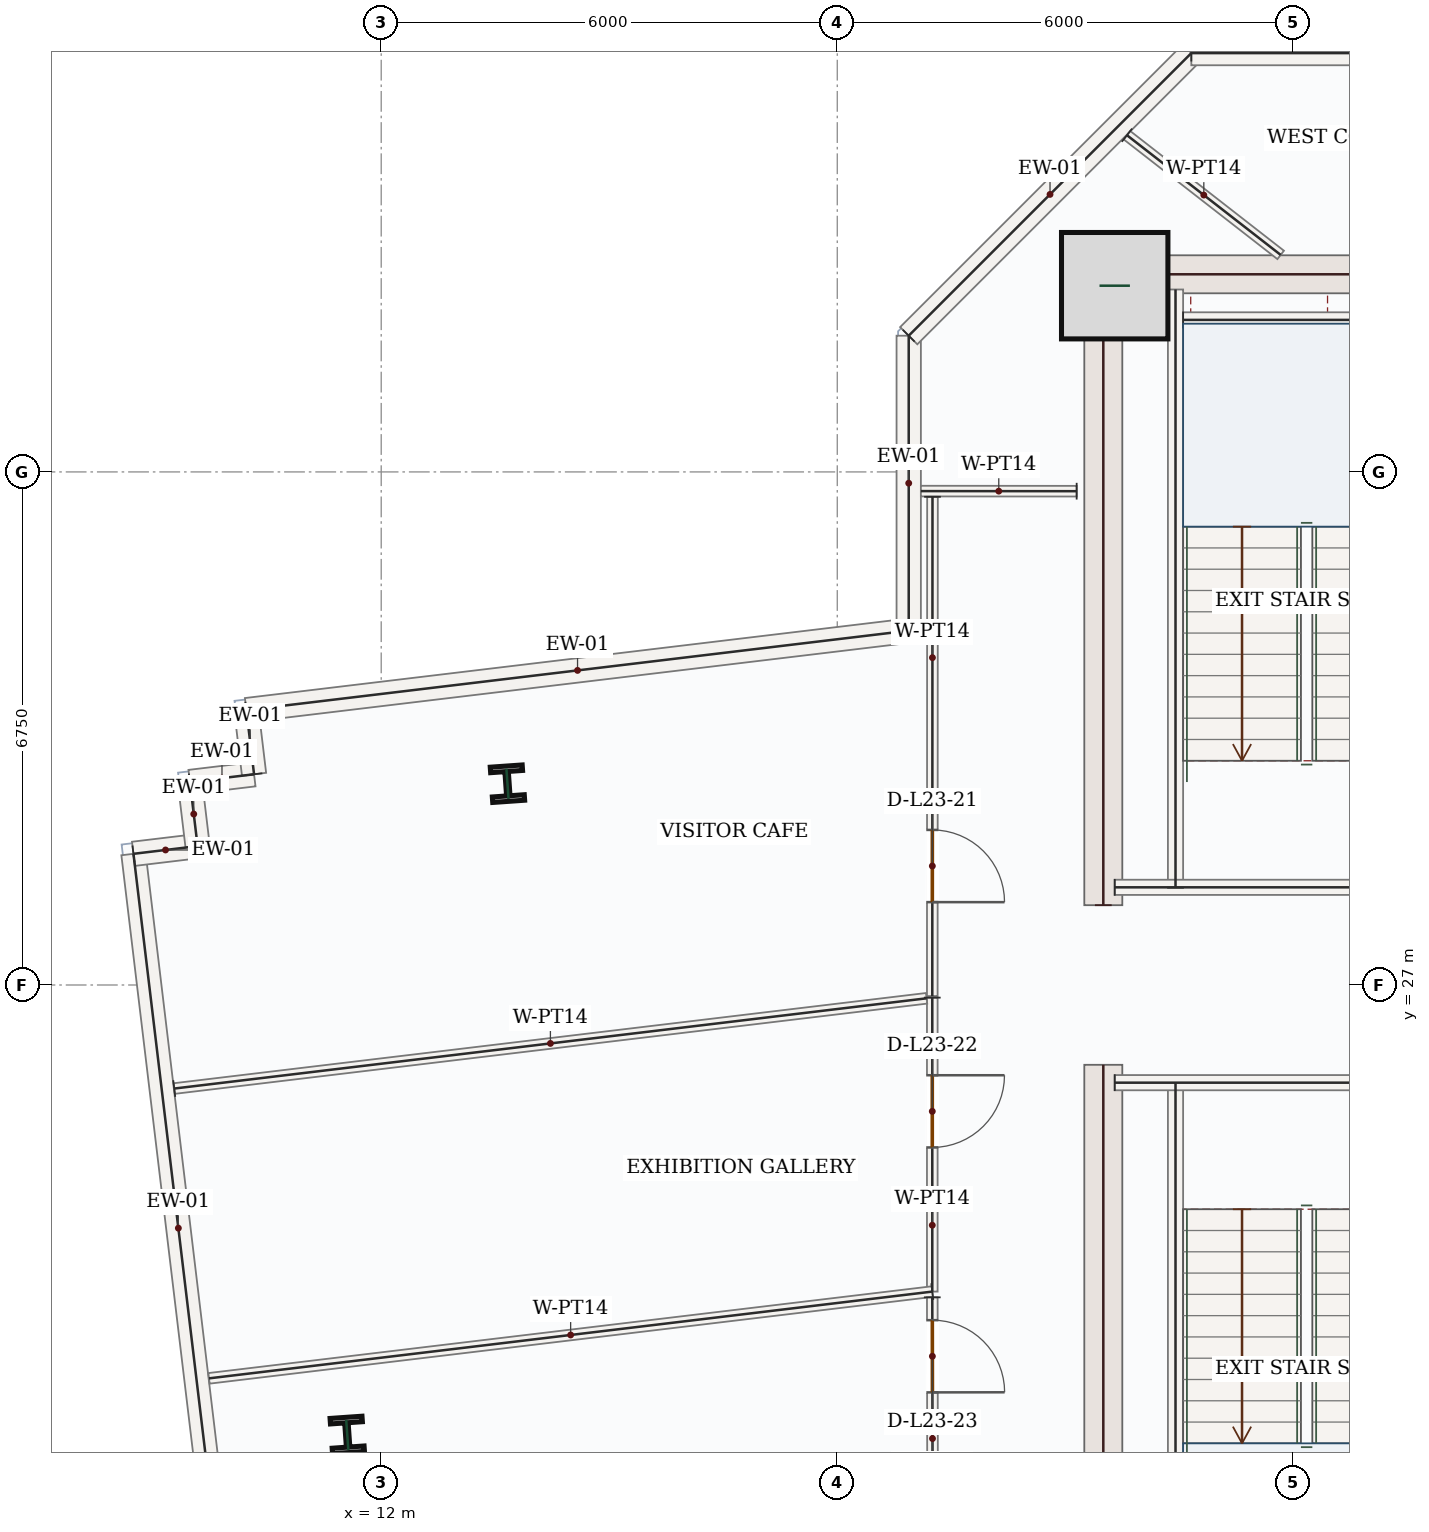
"""IFC4 building model, lengths in metres.
Left out: names, types, materials, properties, quantities, classifications, styles, units other than length and angle.
Written with IfcOpenShell. Run it as: python <this file> out.ifc"""

import sys

from ifc_helpers import new_model, si_unit, direction, frame, frame_2d, origin, origin_2d, place, context, subcontext, project, spatial, rectangle, i_section, extrude, source, transform, mapped, element, fill, save


model = new_model("IFC4")
c1 = context("Model", 3, precision=1e-05, world=origin(), true_north=direction((0.0, 1.0)))
c2 = subcontext(c1, "Body", "Model", "MODEL_VIEW")
j1 = project(units=[si_unit("LENGTHUNIT", "METRE"), si_unit("PLANEANGLEUNIT", "RADIAN")], contexts=[c1])
p1 = place(None, origin())
s1 = spatial("IfcSite", under=j1, at=p1, CompositionType="ELEMENT")
p2 = place(p1, origin())
s2 = spatial("IfcBuilding", under=s1, at=p2, CompositionType="ELEMENT")
p3 = place(p2, frame((0.0, 0.0, 104.7)))
s3 = spatial("IfcBuildingStorey", under=s2, at=p3, CompositionType="ELEMENT", Elevation=104.7)
m1 = source(origin(), c2, "Body", "SweptSolid", [
    extrude(rectangle(XDim=8.55, YDim=0.5, at=frame_2d((4.275, 0.0))), origin(), (0.0, 0.0, 1.0), 3.95),
])
for number, where, z_axis, x_axis in (
    (1, (21.5, 17.4, 0.0), (0.0, 0.0, 1.0), (0.0, 1.0, 0.0)),
    (2, (21.5, 28.05, 0.0), (0.0, 0.0, 1.0), (0.0, 1.0, 0.0)),
):
    element("IfcWall", number, at=place(p3, frame(where, z_axis=z_axis, x_axis=x_axis)), inside=s3, PredefinedType="SHEAR", context=c2, shape_type="MappedRepresentation", body=[
        mapped(m1, transform((0.0, 0.0, 0.0), x_axis=(1.0, 0.0, 0.0), y_axis=(0.0, 1.0, 0.0), z_axis=(0.0, 0.0, 1.0), scale=1.0)),
    ])
m2 = source(origin(), c2, "Body", "SweptSolid", [
    extrude(rectangle(XDim=7.0, YDim=0.5, at=frame_2d((3.5, 0.0))), origin(), (0.0, 0.0, 1.0), 3.95),
])
p4 = place(p3, frame((21.75, 36.35, 0.0), z_axis=(0.0, 0.0, 1.0), x_axis=(1.0, 0.0, 0.0)))
e3 = element("IfcWall", 3, at=p4, inside=s3, PredefinedType="SHEAR", context=c2, shape_type="MappedRepresentation", body=[
    mapped(m2, transform((0.0, 0.0, 0.0), x_axis=(1.0, 0.0, 0.0), y_axis=(0.0, 1.0, 0.0), z_axis=(0.0, 0.0, 1.0), scale=1.0)),
])
m3 = source(origin(), c2, "Body", "SweptSolid", [
    extrude(rectangle(XDim=1.4, YDim=1.4, at=origin_2d()), origin(), (0.0, 0.0, 1.0), 4.2),
])
p5 = place(p3, frame((21.65, 36.2, 0.0), z_axis=(0.0, 0.0, 1.0), x_axis=(1.0, 0.0, 0.0)))
e4 = element("IfcColumn", 4, at=p5, inside=s3, PredefinedType="COLUMN", context=c2, shape_type="MappedRepresentation", body=[
    mapped(m3, transform((0.0, 0.0, 0.0), x_axis=(1.0, 0.0, 0.0), y_axis=(0.0, 1.0, 0.0), z_axis=(0.0, 0.0, 1.0), scale=1.0)),
])
m4 = source(origin(), c2, "Body", "SweptSolid", [
    extrude(i_section(OverallWidth=0.421, OverallDepth=0.465, WebThickness=0.045, FlangeThickness=0.073, FilletRadius=0.018, at=origin_2d()), origin(), (0.0, 0.0, 1.0), 4.2),
])
for number, where, z_axis, x_axis in (
    (5, (13.661, 29.648, 0.0), (0.0, 0.0, 1.0), (0.998, 0.07, 0.0)),
    (6, (11.553, 21.08, 0.0), (0.0, 0.0, 1.0), (0.998, 0.07, 0.0)),
):
    element("IfcColumn", number, at=place(p3, frame(where, z_axis=z_axis, x_axis=x_axis)), inside=s3, PredefinedType="COLUMN", context=c2, shape_type="MappedRepresentation", body=[
        mapped(m4, transform((0.0, 0.0, 0.0), x_axis=(1.0, 0.0, 0.0), y_axis=(0.0, 1.0, 0.0), z_axis=(0.0, 0.0, 1.0), scale=1.0)),
    ])
m5 = source(origin(), c2, "Body", "SweptSolid", [
    extrude(rectangle(XDim=9.92, YDim=0.32, at=frame_2d((4.96, 0.0))), origin(), (0.0, 0.0, 1.0), 3.95),
])
p6 = place(p3, frame((9.922, 18.876, 0.0), z_axis=(0.0, 0.0, 1.0), x_axis=(-0.119092815244, 0.992883125729, 0.0)))
e7 = element("IfcWall", 7, at=p6, inside=s3, PredefinedType="SOLIDWALL", context=c2, shape_type="MappedRepresentation", body=[
    mapped(m5, transform((0.0, 0.0, 0.0), x_axis=(1.0, 0.0, 0.0), y_axis=(0.0, 1.0, 0.0), z_axis=(0.0, 0.0, 1.0), scale=1.0)),
])
m6 = source(origin(), c2, "Body", "SweptSolid", [
    extrude(rectangle(XDim=0.85, YDim=0.32, at=frame_2d((0.425, 0.0))), origin(), (0.0, 0.0, 1.0), 3.95),
])
for number, where, z_axis, x_axis in (
    (8, (8.74, 28.726, 0.0), (0.0, 0.0, 1.0), (0.993, 0.119, 0.0)),
    (9, (9.584, 28.827, 0.0), (0.0, 0.0, 1.0), (-0.119, 0.993, 0.0)),
    (10, (9.483, 29.671, 0.0), (0.0, 0.0, 1.0), (0.993, 0.119, 0.0)),
    (11, (10.327, 29.772, 0.0), (0.0, 0.0, 1.0), (-0.119, 0.993, 0.0)),
):
    element("IfcWall", number, at=place(p3, frame(where, z_axis=z_axis, x_axis=x_axis)), inside=s3, PredefinedType="SOLIDWALL", context=c2, shape_type="MappedRepresentation", body=[
        mapped(m6, transform((0.0, 0.0, 0.0), x_axis=(1.0, 0.0, 0.0), y_axis=(0.0, 1.0, 0.0), z_axis=(0.0, 0.0, 1.0), scale=1.0)),
    ])
m7 = source(origin(), c2, "Body", "SweptSolid", [
    extrude(rectangle(XDim=8.777, YDim=0.32, at=frame_2d((4.388, 0.0))), origin(), (0.0, 0.0, 1.0), 3.95),
])
p7 = place(p3, frame((10.226, 30.616, 0.0), z_axis=(0.0, 0.0, 1.0), x_axis=(0.992883944618, 0.119085987922, 0.0)))
e12 = element("IfcWall", 12, at=p7, inside=s3, PredefinedType="SOLIDWALL", context=c2, shape_type="MappedRepresentation", body=[
    mapped(m7, transform((0.0, 0.0, 0.0), x_axis=(1.0, 0.0, 0.0), y_axis=(0.0, 1.0, 0.0), z_axis=(0.0, 0.0, 1.0), scale=1.0)),
])
m8 = source(origin(), c2, "Body", "SweptSolid", [
    extrude(rectangle(XDim=3.881, YDim=0.32, at=frame_2d((1.94, 0.0))), origin(), (0.0, 0.0, 1.0), 3.95),
])
p8 = place(p3, frame((18.94, 31.661, 0.0), z_axis=(0.0, 0.0, 1.0), x_axis=(0.0, 1.0, 0.0)))
e13 = element("IfcWall", 13, at=p8, inside=s3, PredefinedType="SOLIDWALL", context=c2, shape_type="MappedRepresentation", body=[
    mapped(m8, transform((0.0, 0.0, 0.0), x_axis=(1.0, 0.0, 0.0), y_axis=(0.0, 1.0, 0.0), z_axis=(0.0, 0.0, 1.0), scale=1.0)),
])
m9 = source(origin(), c2, "Body", "SweptSolid", [
    extrude(rectangle(XDim=5.258, YDim=0.32, at=frame_2d((2.629, 0.0))), origin(), (0.0, 0.0, 1.0), 3.95),
])
p9 = place(p3, frame((18.94, 35.542, 0.0), z_axis=(0.0, 0.0, 1.0), x_axis=(0.707106781187, 0.707106781187, 0.0)))
e14 = element("IfcWall", 14, at=p9, inside=s3, PredefinedType="SOLIDWALL", context=c2, shape_type="MappedRepresentation", body=[
    mapped(m9, transform((0.0, 0.0, 0.0), x_axis=(1.0, 0.0, 0.0), y_axis=(0.0, 1.0, 0.0), z_axis=(0.0, 0.0, 1.0), scale=1.0)),
])
m10 = source(origin(), c2, "Body", "SweptSolid", [
    extrude(rectangle(XDim=5.164, YDim=0.32, at=frame_2d((2.582, 0.0))), origin(), (0.0, 0.0, 1.0), 3.95),
])
p10 = place(p3, frame((22.658, 39.26, 0.0), z_axis=(0.0, 0.0, 1.0), x_axis=(1.0, 0.0, 0.0)))
e15 = element("IfcWall", 15, at=p10, inside=s3, PredefinedType="SOLIDWALL", context=c2, shape_type="MappedRepresentation", body=[
    mapped(m10, transform((0.0, 0.0, 0.0), x_axis=(1.0, 0.0, 0.0), y_axis=(0.0, 1.0, 0.0), z_axis=(0.0, 0.0, 1.0), scale=1.0)),
])
m11 = source(origin(), c2, "Body", "SweptSolid", [
    extrude(rectangle(XDim=7.87, YDim=0.2, at=frame_2d((3.935, 0.0))), origin(), (0.0, 0.0, 1.0), 3.95),
])
for number, where, z_axis, x_axis in (
    (16, (22.45, 17.85, 0.0), (0.0, 0.0, 1.0), (0.0, 1.0, 0.0)),
    (17, (22.45, 28.28, 0.0), (0.0, 0.0, 1.0), (0.0, 1.0, 0.0)),
):
    element("IfcWall", number, at=place(p3, frame(where, z_axis=z_axis, x_axis=x_axis)), inside=s3, PredefinedType="SOLIDWALL", context=c2, shape_type="MappedRepresentation", body=[
        mapped(m11, transform((0.0, 0.0, 0.0), x_axis=(1.0, 0.0, 0.0), y_axis=(0.0, 1.0, 0.0), z_axis=(0.0, 0.0, 1.0), scale=1.0)),
    ])
m12 = source(origin(), c2, "Body", "SweptSolid", [
    extrude(rectangle(XDim=4.25, YDim=0.2, at=frame_2d((2.125, 0.0))), origin(), (0.0, 0.0, 1.0), 3.95),
])
for number, where, z_axis, x_axis in (
    (18, (21.65, 25.715, 0.0), (0.0, 0.0, 1.0), (1.0, 0.0, 0.0)),
    (19, (21.65, 28.285, 0.0), (0.0, 0.0, 1.0), (1.0, 0.0, 0.0)),
):
    element("IfcWall", number, at=place(p3, frame(where, z_axis=z_axis, x_axis=x_axis)), inside=s3, PredefinedType="SOLIDWALL", context=c2, shape_type="MappedRepresentation", body=[
        mapped(m12, transform((0.0, 0.0, 0.0), x_axis=(1.0, 0.0, 0.0), y_axis=(0.0, 1.0, 0.0), z_axis=(0.0, 0.0, 1.0), scale=1.0)),
    ])
m13 = source(origin(), c2, "Body", "SweptSolid", [
    extrude(rectangle(XDim=3.25, YDim=0.2, at=frame_2d((1.625, 0.0))), origin(), (0.0, 0.0, 1.0), 3.95),
])
p11 = place(p3, frame((22.55, 35.75, 0.0), z_axis=(0.0, 0.0, 1.0), x_axis=(1.0, 0.0, 0.0)))
e20 = element("IfcWall", 20, at=p11, inside=s3, PredefinedType="SOLIDWALL", context=c2, shape_type="MappedRepresentation", body=[
    mapped(m13, transform((0.0, 0.0, 0.0), x_axis=(1.0, 0.0, 0.0), y_axis=(0.0, 1.0, 0.0), z_axis=(0.0, 0.0, 1.0), scale=1.0)),
])
p12 = place(p3, frame((19.25, 26.834, 0.0), z_axis=(0.0, 0.0, 1.0), x_axis=(0.0, -1.0, 0.0)))
e21 = element("IfcWall", 21, at=p12, inside=s3, PredefinedType="PARTITIONING", context=c2, shape_type="SweptSolid", body=[
    extrude(rectangle(XDim=3.868, YDim=0.14, at=frame_2d((1.934, 0.0))), origin(), (0.0, 0.0, 1.0), 3.95),
])
p13 = place(p12, frame((1.021, 0.0, 0.0)))
e22 = element("IfcOpeningElement", 22, at=p13, cuts=e21, PredefinedType="OPENING", context=c2, shape_type="SweptSolid", body=[
    extrude(rectangle(XDim=0.95, YDim=2.15, at=frame_2d((0.475, 1.075))), frame((0.0, 0.08, 0.0), z_axis=(0.0, -1.0, 0.0), x_axis=(1.0, 0.0, 0.0)), (0.0, 0.0, 1.0), 0.16),
])
m14 = source(origin(), c2, "Body", "SweptSolid", [
    extrude(rectangle(XDim=9.584, YDim=0.14, at=frame_2d((4.792, 0.0))), origin(), (0.0, 0.0, 1.0), 3.95),
])
p14 = place(p3, frame((19.25, 22.966, 0.0), z_axis=(0.0, 0.0, 1.0), x_axis=(-0.992883225705, -0.119091981737, 0.0)))
e23 = element("IfcWall", 23, at=p14, inside=s3, PredefinedType="PARTITIONING", context=c2, shape_type="MappedRepresentation", body=[
    mapped(m14, transform((0.0, 0.0, 0.0), x_axis=(1.0, 0.0, 0.0), y_axis=(0.0, 1.0, 0.0), z_axis=(0.0, 0.0, 1.0), scale=1.0)),
])
m15 = source(origin(), c2, "Body", "SweptSolid", [
    extrude(rectangle(XDim=9.969, YDim=0.14, at=frame_2d((4.984, 0.0))), origin(), (0.0, 0.0, 1.0), 3.95),
])
p15 = place(p3, frame((9.277, 25.638, 0.0), z_axis=(0.0, 0.0, 1.0), x_axis=(0.992882747367, 0.119095969623, 0.0)))
e24 = element("IfcWall", 24, at=p15, inside=s3, PredefinedType="PARTITIONING", context=c2, shape_type="MappedRepresentation", body=[
    mapped(m15, transform((0.0, 0.0, 0.0), x_axis=(1.0, 0.0, 0.0), y_axis=(0.0, 1.0, 0.0), z_axis=(0.0, 0.0, 1.0), scale=1.0)),
])
m16 = source(origin(), c2, "Body", "SweptSolid", [
    extrude(rectangle(XDim=2.049, YDim=0.14, at=frame_2d((1.025, 0.0))), origin(), (0.0, 0.0, 1.0), 3.95),
])
p16 = place(p3, frame((21.149, 33.497, 0.0), z_axis=(0.0, 0.0, 1.0), x_axis=(-0.999999822593, 0.000595663464, 0.0)))
e25 = element("IfcWall", 25, at=p16, inside=s3, PredefinedType="PARTITIONING", context=c2, shape_type="MappedRepresentation", body=[
    mapped(m16, transform((0.0, 0.0, 0.0), x_axis=(1.0, 0.0, 0.0), y_axis=(0.0, 1.0, 0.0), z_axis=(0.0, 0.0, 1.0), scale=1.0)),
])
p17 = place(p3, frame((19.253, 33.423, 0.0), z_axis=(0.0, 0.0, 1.0), x_axis=(-0.000408845905, -0.999999916423, 0.0)))
e26 = element("IfcWall", 26, at=p17, inside=s3, PredefinedType="PARTITIONING", context=c2, shape_type="SweptSolid", body=[
    extrude(rectangle(XDim=6.569, YDim=0.14, at=frame_2d((3.284, 0.0))), origin(), (0.0, 0.0, 1.0), 3.95),
])
p18 = place(p17, frame((4.382, 0.0, 0.0)))
e27 = element("IfcOpeningElement", 27, at=p18, cuts=e26, PredefinedType="OPENING", context=c2, shape_type="SweptSolid", body=[
    extrude(rectangle(XDim=0.95, YDim=2.15, at=frame_2d((0.475, 1.075))), frame((0.0, 0.08, 0.0), z_axis=(0.0, -1.0, 0.0), x_axis=(1.0, 0.0, 0.0)), (0.0, 0.0, 1.0), 0.16),
])
m17 = source(origin(), c2, "Body", "SweptSolid", [
    extrude(rectangle(XDim=2.563, YDim=0.14, at=frame_2d((1.282, 0.0))), origin(), (0.0, 0.0, 1.0), 3.95),
])
p19 = place(p3, frame((21.811, 38.18, 0.0), z_axis=(0.0, 0.0, 1.0), x_axis=(0.789034129839, -0.614349364734, 0.0)))
e28 = element("IfcWall", 28, at=p19, inside=s3, PredefinedType="PARTITIONING", context=c2, shape_type="MappedRepresentation", body=[
    mapped(m17, transform((0.0, 0.0, 0.0), x_axis=(1.0, 0.0, 0.0), y_axis=(0.0, 1.0, 0.0), z_axis=(0.0, 0.0, 1.0), scale=1.0)),
])
p20 = place(p3, frame((19.25, 22.891, 0.0), z_axis=(0.0, 0.0, 1.0), x_axis=(0.001476168784, -0.999998910462, 0.0)))
e29 = element("IfcWall", 29, at=p20, inside=s3, PredefinedType="PARTITIONING", context=c2, shape_type="SweptSolid", body=[
    extrude(rectangle(XDim=2.315, YDim=0.14, at=frame_2d((1.158, 0.0))), origin(), (0.0, 0.0, 1.0), 3.95),
])
p21 = place(p20, frame((0.3, 0.0, 0.0)))
e30 = element("IfcOpeningElement", 30, at=p21, cuts=e29, PredefinedType="OPENING", context=c2, shape_type="SweptSolid", body=[
    extrude(rectangle(XDim=0.95, YDim=2.15, at=frame_2d((0.475, 1.075))), frame((0.0, 0.08, 0.0), z_axis=(0.0, -1.0, 0.0), x_axis=(1.0, 0.0, 0.0)), (0.0, 0.0, 1.0), 0.16),
])
m18 = source(origin(), c2, "Body", "SweptSolid", [
    extrude(rectangle(XDim=0.95, YDim=2.15, at=frame_2d((0.475, 1.075))), frame((0.0, 0.025, 0.0), z_axis=(0.0, -1.0, 0.0), x_axis=(1.0, 0.0, 0.0)), (0.0, 0.0, 1.0), 0.05),
])
p22 = place(p18, origin())
e31 = element("IfcDoor", 31, at=p22, inside=s3, OperationType="SINGLE_SWING_RIGHT", PredefinedType="DOOR", context=c2, shape_type="MappedRepresentation", body=[
    mapped(m18, transform((0.0, 0.0, 0.0), x_axis=(1.0, 0.0, 0.0), y_axis=(0.0, 1.0, 0.0), z_axis=(0.0, 0.0, 1.0), scale=1.0)),
])
fill(e27, e31)
p23 = place(p13, origin())
e32 = element("IfcDoor", 32, at=p23, inside=s3, OperationType="SINGLE_SWING_LEFT", PredefinedType="DOOR", context=c2, shape_type="MappedRepresentation", body=[
    mapped(m18, transform((0.0, 0.0, 0.0), x_axis=(1.0, 0.0, 0.0), y_axis=(0.0, 1.0, 0.0), z_axis=(0.0, 0.0, 1.0), scale=1.0)),
])
fill(e22, e32)
p24 = place(p21, origin())
e33 = element("IfcDoor", 33, at=p24, inside=s3, OperationType="SINGLE_SWING_RIGHT", PredefinedType="DOOR", context=c2, shape_type="MappedRepresentation", body=[
    mapped(m18, transform((0.0, 0.0, 0.0), x_axis=(1.0, 0.0, 0.0), y_axis=(0.0, 1.0, 0.0), z_axis=(0.0, 0.0, 1.0), scale=1.0)),
])
fill(e30, e33)
save(model, sys.argv[1])
